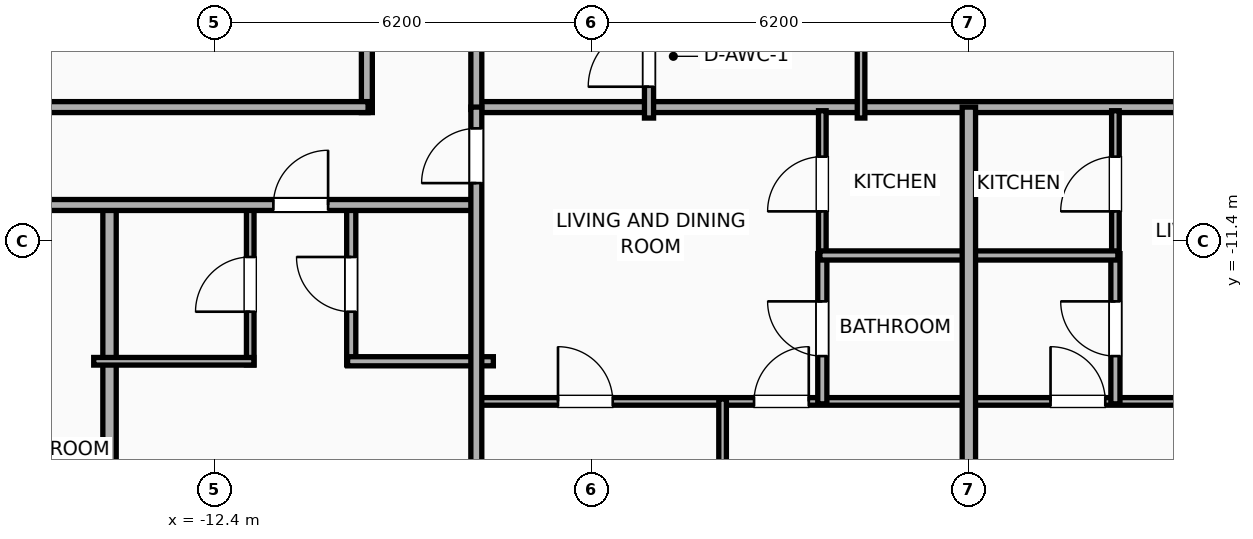
"""IFC4 building model, lengths in metres.
Left out: names, types, materials, properties, quantities, classifications, styles, units other than length and angle.
Written with IfcOpenShell. Run it as: python <this file> out.ifc"""

import sys

from ifc_helpers import new_model, si_unit, direction, frame, frame_2d, origin, place, context, subcontext, project, spatial, rectangle, extrude, element, fill, save


model = new_model("IFC4")
c1 = context("Model", 3, precision=1e-05, world=origin(), true_north=direction((0.0, 1.0)))
c2 = subcontext(c1, "Body", "Model", "MODEL_VIEW")
j1 = project(units=[si_unit("LENGTHUNIT", "METRE"), si_unit("PLANEANGLEUNIT", "RADIAN")], contexts=[c1])
p1 = place(None, origin())
s1 = spatial("IfcSite", under=j1, at=p1, CompositionType="ELEMENT")
p2 = place(p1, origin())
s2 = spatial("IfcBuilding", under=s1, at=p2, CompositionType="ELEMENT")
p3 = place(p2, frame((0.0, 0.0, 219.7)))
s3 = spatial("IfcBuildingStorey", under=s2, at=p3, CompositionType="ELEMENT", Elevation=219.7)
p4 = place(p3, frame((-9.9, -9.28, 0.0), z_axis=(0.0, 0.0, 1.0), x_axis=(0.0, 1.0, 0.0)))
e1 = element("IfcWall", 1, at=p4, inside=s3, PredefinedType="PARTITIONING", context=c2, shape_type="SweptSolid", body=[
    extrude(rectangle(XDim=18.56, YDim=0.18, at=frame_2d((9.28, 0.0))), origin(), (0.0, 0.0, 1.0), 3.65),
])
p5 = place(p4, frame((7.802, 0.0, 0.0)))
e2 = element("IfcOpeningElement", 2, at=p5, cuts=e1, PredefinedType="OPENING", context=c2, shape_type="SweptSolid", body=[
    extrude(rectangle(XDim=1.1, YDim=2.05, at=frame_2d((0.55, 1.025))), frame((0.0, 0.1, 0.0), z_axis=(0.0, -1.0, 0.0), x_axis=(1.0, 0.0, 0.0)), (0.0, 0.0, 1.0), 0.2),
])
p6 = place(p3, frame((-26.23, -9.19, 0.0), z_axis=(0.0, 0.0, 1.0), x_axis=(1.0, 0.0, 0.0)))
e3 = element("IfcWall", 3, at=p6, inside=s3, PredefinedType="PARTITIONING", context=c2, shape_type="SweptSolid", body=[
    extrude(rectangle(XDim=16.35, YDim=0.18, at=frame_2d((8.175, 0.0))), origin(), (0.0, 0.0, 1.0), 3.65),
])
p7 = place(p3, frame((-8.15, -9.19, 0.0), z_axis=(0.0, 0.0, 1.0), x_axis=(1.0, 0.0, 0.0)))
e4 = element("IfcWall", 4, at=p7, inside=s3, PredefinedType="PARTITIONING", context=c2, shape_type="SweptSolid", body=[
    extrude(rectangle(XDim=16.3, YDim=0.18, at=frame_2d((8.15, 0.0))), origin(), (0.0, 0.0, 1.0), 3.65),
])
p8 = place(p3, frame((-8.1, -9.23, 0.0), z_axis=(0.0, 0.0, 1.0), x_axis=(0.0, 1.0, 0.0)))
e5 = element("IfcWall", 5, at=p8, inside=s3, PredefinedType="PARTITIONING", context=c2, shape_type="SweptSolid", body=[
    extrude(rectangle(XDim=18.46, YDim=0.18, at=frame_2d((9.23, 0.0))), origin(), (0.0, 0.0, 1.0), 3.65),
])
p9 = place(p8, frame((1.346, 0.0, 0.0)))
e6 = element("IfcOpeningElement", 6, at=p9, cuts=e5, PredefinedType="OPENING", context=c2, shape_type="SweptSolid", body=[
    extrude(rectangle(XDim=1.0, YDim=2.05, at=frame_2d((0.5, 1.025))), frame((0.0, 0.1, 0.0), z_axis=(0.0, -1.0, 0.0), x_axis=(1.0, 0.0, 0.0)), (0.0, 0.0, 1.0), 0.2),
])
p10 = place(p8, frame((10.601, 0.0, 0.0)))
e7 = element("IfcOpeningElement", 7, at=p10, cuts=e5, PredefinedType="OPENING", context=c2, shape_type="SweptSolid", body=[
    extrude(rectangle(XDim=0.95, YDim=2.05, at=frame_2d((0.475, 1.025))), frame((0.0, 0.1, 0.0), z_axis=(0.0, -1.0, 0.0), x_axis=(1.0, 0.0, 0.0)), (0.0, 0.0, 1.0), 0.2),
])
p11 = place(p3, frame((-5.26, -9.37, 0.0), z_axis=(0.0, 0.0, 1.0), x_axis=(0.0, 1.0, 0.0)))
e8 = element("IfcWall", 8, at=p11, inside=s3, PredefinedType="PLUMBINGWALL", context=c2, shape_type="SweptSolid", body=[
    extrude(rectangle(XDim=3.35, YDim=0.15, at=frame_2d((1.675, 0.0))), origin(), (0.0, 0.0, 1.0), 3.65),
])
p12 = place(p11, frame((0.515, 0.0, 0.0)))
e9 = element("IfcOpeningElement", 9, at=p12, cuts=e8, PredefinedType="OPENING", context=c2, shape_type="SweptSolid", body=[
    extrude(rectangle(XDim=1.0, YDim=2.05, at=frame_2d((0.5, 1.025))), frame((0.0, 0.085, 0.0), z_axis=(0.0, -1.0, 0.0), x_axis=(1.0, 0.0, 0.0)), (0.0, 0.0, 1.0), 0.17),
])
p13 = place(p3, frame((-1.773, -9.37, 0.0), z_axis=(0.0, 0.0, 1.0), x_axis=(0.0, 1.0, 0.0)))
e10 = element("IfcWall", 10, at=p13, inside=s3, PredefinedType="PARTITIONING", context=c2, shape_type="SweptSolid", body=[
    extrude(rectangle(XDim=18.69, YDim=0.125, at=frame_2d((9.345, 0.0))), origin(), (0.0, 0.0, 1.0), 3.65),
])
p14 = place(p13, frame((8.87, 0.0, 0.0)))
e11 = element("IfcOpeningElement", 11, at=p14, cuts=e10, PredefinedType="OPENING", context=c2, shape_type="SweptSolid", body=[
    extrude(rectangle(XDim=0.95, YDim=2.05, at=frame_2d((0.475, 1.025))), frame((0.0, 0.073, 0.0), z_axis=(0.0, -1.0, 0.0), x_axis=(1.0, 0.0, 0.0)), (0.0, 0.0, 1.0), 0.145),
])
p15 = place(p3, frame((-14.132, -18.83, 0.0), z_axis=(0.0, 0.0, 1.0), x_axis=(0.0, 1.0, 0.0)))
e12 = element("IfcWall", 12, at=p15, inside=s3, PredefinedType="PARTITIONING", context=c2, shape_type="SweptSolid", body=[
    extrude(rectangle(XDim=8.11, YDim=0.22, at=frame_2d((4.055, 0.0))), origin(), (0.0, 0.0, 1.0), 3.65),
])
p16 = place(p3, frame((-11.818, -13.43, 0.0), z_axis=(0.0, 0.0, 1.0), x_axis=(0.0, 1.0, 0.0)))
e13 = element("IfcWall", 13, at=p16, inside=s3, PredefinedType="PARTITIONING", context=c2, shape_type="SweptSolid", body=[
    extrude(rectangle(XDim=2.65, YDim=0.125, at=frame_2d((1.325, 0.0))), origin(), (0.0, 0.0, 1.0), 3.65),
])
p17 = place(p16, frame((0.875, 0.0, 0.0)))
e14 = element("IfcOpeningElement", 14, at=p17, cuts=e13, PredefinedType="OPENING", context=c2, shape_type="SweptSolid", body=[
    extrude(rectangle(XDim=0.9, YDim=2.05, at=frame_2d((0.45, 1.025))), frame((0.0, 0.073, 0.0), z_axis=(0.0, -1.0, 0.0), x_axis=(1.0, 0.0, 0.0)), (0.0, 0.0, 1.0), 0.145),
])
p18 = place(p3, frame((-10.157, -13.43, 0.0), z_axis=(0.0, 0.0, 1.0), x_axis=(0.0, 1.0, 0.0)))
e15 = element("IfcWall", 15, at=p18, inside=s3, PredefinedType="PLUMBINGWALL", context=c2, shape_type="SweptSolid", body=[
    extrude(rectangle(XDim=2.65, YDim=0.15, at=frame_2d((1.325, 0.0))), origin(), (0.0, 0.0, 1.0), 3.65),
])
p19 = place(p18, frame((0.875, 0.0, 0.0)))
e16 = element("IfcOpeningElement", 16, at=p19, cuts=e15, PredefinedType="OPENING", context=c2, shape_type="SweptSolid", body=[
    extrude(rectangle(XDim=0.9, YDim=2.05, at=frame_2d((0.45, 1.025))), frame((0.0, 0.085, 0.0), z_axis=(0.0, -1.0, 0.0), x_axis=(1.0, 0.0, 0.0)), (0.0, 0.0, 1.0), 0.17),
])
p20 = place(p3, frame((-14.392, -13.37, 0.0), z_axis=(0.0, 0.0, 1.0), x_axis=(1.0, 0.0, 0.0)))
e17 = element("IfcWall", 17, at=p20, inside=s3, PredefinedType="PARTITIONING", context=c2, shape_type="SweptSolid", body=[
    extrude(rectangle(XDim=2.634, YDim=0.125, at=frame_2d((1.317, 0.0))), origin(), (0.0, 0.0, 1.0), 3.65),
])
p21 = place(p3, frame((-10.217, -13.37, 0.0), z_axis=(0.0, 0.0, 1.0), x_axis=(1.0, 0.0, 0.0)))
e18 = element("IfcWall", 18, at=p21, inside=s3, PredefinedType="PLUMBINGWALL", context=c2, shape_type="SweptSolid", body=[
    extrude(rectangle(XDim=2.397, YDim=0.15, at=frame_2d((1.198, 0.0))), origin(), (0.0, 0.0, 1.0), 3.65),
])
p22 = place(p3, frame((-26.23, -10.8, 0.0), z_axis=(0.0, 0.0, 1.0), x_axis=(1.0, 0.0, 0.0)))
e19 = element("IfcWall", 19, at=p22, inside=s3, PredefinedType="PARTITIONING", context=c2, shape_type="SweptSolid", body=[
    extrude(rectangle(XDim=18.15, YDim=0.18, at=frame_2d((9.075, 0.0))), origin(), (0.0, 0.0, 1.0), 3.65),
])
p23 = place(p22, frame((2.659, 0.0, 0.0)))
e20 = element("IfcOpeningElement", 20, at=p23, cuts=e19, PredefinedType="OPENING", context=c2, shape_type="SweptSolid", body=[
    extrude(rectangle(XDim=0.9, YDim=2.05, at=frame_2d((0.45, 1.025))), frame((0.0, 0.1, 0.0), z_axis=(0.0, -1.0, 0.0), x_axis=(1.0, 0.0, 0.0)), (0.0, 0.0, 1.0), 0.2),
])
p24 = place(p22, frame((9.754, 0.0, 0.0)))
e21 = element("IfcOpeningElement", 21, at=p24, cuts=e19, PredefinedType="OPENING", context=c2, shape_type="SweptSolid", body=[
    extrude(rectangle(XDim=1.15, YDim=2.05, at=frame_2d((0.575, 1.025))), frame((0.0, 0.1, 0.0), z_axis=(0.0, -1.0, 0.0), x_axis=(1.0, 0.0, 0.0)), (0.0, 0.0, 1.0), 0.2),
])
p25 = place(p22, frame((14.792, 0.0, 0.0)))
e22 = element("IfcOpeningElement", 22, at=p25, cuts=e19, PredefinedType="OPENING", context=c2, shape_type="SweptSolid", body=[
    extrude(rectangle(XDim=0.9, YDim=2.05, at=frame_2d((0.45, 1.025))), frame((0.0, 0.1, 0.0), z_axis=(0.0, -1.0, 0.0), x_axis=(1.0, 0.0, 0.0)), (0.0, 0.0, 1.0), 0.2),
])
p26 = place(p3, frame((-8.08, -14.03, 0.0), z_axis=(0.0, 0.0, 1.0), x_axis=(1.0, 0.0, 0.0)))
e23 = element("IfcWall", 23, at=p26, inside=s3, PredefinedType="PARTITIONING", context=c2, shape_type="SweptSolid", body=[
    extrude(rectangle(XDim=8.06, YDim=0.125, at=frame_2d((4.03, 0.0))), origin(), (0.0, 0.0, 1.0), 3.65),
])
p27 = place(p26, frame((1.323, 0.0, 0.0)))
e24 = element("IfcOpeningElement", 24, at=p27, cuts=e23, PredefinedType="OPENING", context=c2, shape_type="SweptSolid", body=[
    extrude(rectangle(XDim=0.9, YDim=2.05, at=frame_2d((0.45, 1.025))), frame((0.0, 0.073, 0.0), z_axis=(0.0, -1.0, 0.0), x_axis=(1.0, 0.0, 0.0)), (0.0, 0.0, 1.0), 0.145),
])
p28 = place(p26, frame((4.547, 0.0, 0.0)))
e25 = element("IfcOpeningElement", 25, at=p28, cuts=e23, PredefinedType="OPENING", context=c2, shape_type="SweptSolid", body=[
    extrude(rectangle(XDim=0.9, YDim=2.05, at=frame_2d((0.45, 1.025))), frame((0.0, 0.073, 0.0), z_axis=(0.0, -1.0, 0.0), x_axis=(1.0, 0.0, 0.0)), (0.0, 0.0, 1.0), 0.145),
])
p29 = place(p3, frame((-2.41, -11.66, 0.0), z_axis=(0.0, 0.0, 1.0), x_axis=(0.0, 1.0, 0.0)))
e26 = element("IfcWall", 26, at=p29, inside=s3, PredefinedType="PARTITIONING", context=c2, shape_type="SweptSolid", body=[
    extrude(rectangle(XDim=2.41, YDim=0.125, at=frame_2d((1.205, 0.0))), origin(), (0.0, 0.0, 1.0), 3.65),
])
p30 = place(p29, frame((0.755, 0.0, 0.0)))
e27 = element("IfcOpeningElement", 27, at=p30, cuts=e26, PredefinedType="OPENING", context=c2, shape_type="SweptSolid", body=[
    extrude(rectangle(XDim=0.9, YDim=2.05, at=frame_2d((0.45, 1.025))), frame((0.0, 0.073, 0.0), z_axis=(0.0, -1.0, 0.0), x_axis=(1.0, 0.0, 0.0)), (0.0, 0.0, 1.0), 0.145),
])
p31 = place(p3, frame((-2.41, -14.07, 0.0), z_axis=(0.0, 0.0, 1.0), x_axis=(0.0, 1.0, 0.0)))
e28 = element("IfcWall", 28, at=p31, inside=s3, PredefinedType="PLUMBINGWALL", context=c2, shape_type="SweptSolid", body=[
    extrude(rectangle(XDim=2.47, YDim=0.15, at=frame_2d((1.235, 0.0))), origin(), (0.0, 0.0, 1.0), 3.65),
])
p32 = place(p31, frame((0.785, 0.0, 0.0)))
e29 = element("IfcOpeningElement", 29, at=p32, cuts=e28, PredefinedType="OPENING", context=c2, shape_type="SweptSolid", body=[
    extrude(rectangle(XDim=0.9, YDim=2.05, at=frame_2d((0.45, 1.025))), frame((0.0, 0.085, 0.0), z_axis=(0.0, -1.0, 0.0), x_axis=(1.0, 0.0, 0.0)), (0.0, 0.0, 1.0), 0.17),
])
p33 = place(p3, frame((-2.45, -11.63, 0.0), z_axis=(0.0, 0.0, 1.0), x_axis=(1.0, 0.0, 0.0)))
e30 = element("IfcWall", 30, at=p33, inside=s3, PredefinedType="PLUMBINGWALL", context=c2, shape_type="SweptSolid", body=[
    extrude(rectangle(XDim=2.43, YDim=0.15, at=frame_2d((1.215, 0.0))), origin(), (0.0, 0.0, 1.0), 3.65),
])
p34 = place(p3, frame((-4.05, -18.83, 0.0), z_axis=(0.0, 0.0, 1.0), x_axis=(0.0, 1.0, 0.0)))
e31 = element("IfcWall", 31, at=p34, inside=s3, PredefinedType="PARTITIONING", context=c2, shape_type="SweptSolid", body=[
    extrude(rectangle(XDim=4.84, YDim=0.125, at=frame_2d((2.42, 0.0))), origin(), (0.0, 0.0, 1.0), 3.65),
])
p35 = place(p3, frame((-8.1, -18.83, 0.0), z_axis=(0.0, 0.0, 1.0), x_axis=(0.0, 1.0, 0.0)))
e32 = element("IfcWall", 32, at=p35, inside=s3, PredefinedType="PARTITIONING", context=c2, shape_type="SweptSolid", body=[
    extrude(rectangle(XDim=9.64, YDim=0.18, at=frame_2d((4.82, 0.0))), origin(), (0.0, 0.0, 1.0), 3.65),
])
p36 = place(p35, frame((8.39, 0.0, 0.0)))
e33 = element("IfcOpeningElement", 33, at=p36, cuts=e32, PredefinedType="OPENING", context=c2, shape_type="SweptSolid", body=[
    extrude(rectangle(XDim=0.9, YDim=2.05, at=frame_2d((0.45, 1.025))), frame((0.0, 0.1, 0.0), z_axis=(0.0, -1.0, 0.0), x_axis=(1.0, 0.0, 0.0)), (0.0, 0.0, 1.0), 0.2),
])
p37 = place(p3, frame((0.02, -14.03, 0.0), z_axis=(0.0, 0.0, 1.0), x_axis=(1.0, 0.0, 0.0)))
e34 = element("IfcWall", 34, at=p37, inside=s3, PredefinedType="PARTITIONING", context=c2, shape_type="SweptSolid", body=[
    extrude(rectangle(XDim=8.06, YDim=0.125, at=frame_2d((4.03, 0.0))), origin(), (0.0, 0.0, 1.0), 3.65),
])
p38 = place(p37, frame((1.323, 0.0, 0.0)))
e35 = element("IfcOpeningElement", 35, at=p38, cuts=e34, PredefinedType="OPENING", context=c2, shape_type="SweptSolid", body=[
    extrude(rectangle(XDim=0.9, YDim=2.05, at=frame_2d((0.45, 1.025))), frame((0.0, 0.073, 0.0), z_axis=(0.0, -1.0, 0.0), x_axis=(1.0, 0.0, 0.0)), (0.0, 0.0, 1.0), 0.145),
])
p39 = place(p37, frame((5.837, 0.0, 0.0)))
e36 = element("IfcOpeningElement", 36, at=p39, cuts=e34, PredefinedType="OPENING", context=c2, shape_type="SweptSolid", body=[
    extrude(rectangle(XDim=0.9, YDim=2.05, at=frame_2d((0.45, 1.025))), frame((0.0, 0.073, 0.0), z_axis=(0.0, -1.0, 0.0), x_axis=(1.0, 0.0, 0.0)), (0.0, 0.0, 1.0), 0.145),
])
p40 = place(p3, frame((2.41, -11.66, 0.0), z_axis=(0.0, 0.0, 1.0), x_axis=(0.0, 1.0, 0.0)))
e37 = element("IfcWall", 37, at=p40, inside=s3, PredefinedType="PARTITIONING", context=c2, shape_type="SweptSolid", body=[
    extrude(rectangle(XDim=2.41, YDim=0.125, at=frame_2d((1.205, 0.0))), origin(), (0.0, 0.0, 1.0), 3.65),
])
p41 = place(p40, frame((0.755, 0.0, 0.0)))
e38 = element("IfcOpeningElement", 38, at=p41, cuts=e37, PredefinedType="OPENING", context=c2, shape_type="SweptSolid", body=[
    extrude(rectangle(XDim=0.9, YDim=2.05, at=frame_2d((0.45, 1.025))), frame((0.0, 0.073, 0.0), z_axis=(0.0, -1.0, 0.0), x_axis=(1.0, 0.0, 0.0)), (0.0, 0.0, 1.0), 0.145),
])
p42 = place(p3, frame((2.41, -14.07, 0.0), z_axis=(0.0, 0.0, 1.0), x_axis=(0.0, 1.0, 0.0)))
e39 = element("IfcWall", 39, at=p42, inside=s3, PredefinedType="PLUMBINGWALL", context=c2, shape_type="SweptSolid", body=[
    extrude(rectangle(XDim=2.47, YDim=0.15, at=frame_2d((1.235, 0.0))), origin(), (0.0, 0.0, 1.0), 3.65),
])
p43 = place(p42, frame((0.785, 0.0, 0.0)))
e40 = element("IfcOpeningElement", 40, at=p43, cuts=e39, PredefinedType="OPENING", context=c2, shape_type="SweptSolid", body=[
    extrude(rectangle(XDim=0.9, YDim=2.05, at=frame_2d((0.45, 1.025))), frame((0.0, 0.085, 0.0), z_axis=(0.0, -1.0, 0.0), x_axis=(1.0, 0.0, 0.0)), (0.0, 0.0, 1.0), 0.17),
])
p44 = place(p3, frame((0.02, -11.63, 0.0), z_axis=(0.0, 0.0, 1.0), x_axis=(1.0, 0.0, 0.0)))
e41 = element("IfcWall", 41, at=p44, inside=s3, PredefinedType="PLUMBINGWALL", context=c2, shape_type="SweptSolid", body=[
    extrude(rectangle(XDim=2.43, YDim=0.15, at=frame_2d((1.215, 0.0))), origin(), (0.0, 0.0, 1.0), 3.65),
])
p45 = place(p3, frame((0.0, -18.83, 0.0), z_axis=(0.0, 0.0, 1.0), x_axis=(0.0, 1.0, 0.0)))
e42 = element("IfcWall", 42, at=p45, inside=s3, PredefinedType="PARTITIONING", context=c2, shape_type="SweptSolid", body=[
    extrude(rectangle(XDim=9.64, YDim=0.22, at=frame_2d((4.82, 0.0))), origin(), (0.0, 0.0, 1.0), 3.65),
])
p46 = place(p12, origin())
e43 = element("IfcDoor", 43, at=p46, inside=s3, OperationType="SINGLE_SWING_LEFT", PredefinedType="DOOR", context=c2, shape_type="SweptSolid", body=[
    extrude(rectangle(XDim=1.0, YDim=2.05, at=frame_2d((0.5, 1.025))), frame((0.0, 0.025, 0.0), z_axis=(0.0, -1.0, 0.0), x_axis=(1.0, 0.0, 0.0)), (0.0, 0.0, 1.0), 0.05),
])
fill(e9, e43)
p47 = place(p17, origin())
e44 = element("IfcDoor", 44, at=p47, inside=s3, OperationType="SINGLE_SWING_LEFT", PredefinedType="DOOR", context=c2, shape_type="SweptSolid", body=[
    extrude(rectangle(XDim=0.9, YDim=2.05, at=frame_2d((0.45, 1.025))), frame((0.0, 0.025, 0.0), z_axis=(0.0, -1.0, 0.0), x_axis=(1.0, 0.0, 0.0)), (0.0, 0.0, 1.0), 0.05),
])
fill(e14, e44)
p48 = place(p19, origin())
e45 = element("IfcDoor", 45, at=p48, inside=s3, OperationType="SINGLE_SWING_RIGHT", PredefinedType="DOOR", context=c2, shape_type="SweptSolid", body=[
    extrude(rectangle(XDim=0.9, YDim=2.05, at=frame_2d((0.45, 1.025))), frame((0.0, 0.025, 0.0), z_axis=(0.0, -1.0, 0.0), x_axis=(1.0, 0.0, 0.0)), (0.0, 0.0, 1.0), 0.05),
])
fill(e16, e45)
p49 = place(p25, origin())
e46 = element("IfcDoor", 46, at=p49, inside=s3, OperationType="SINGLE_SWING_RIGHT", PredefinedType="DOOR", context=c2, shape_type="SweptSolid", body=[
    extrude(rectangle(XDim=0.9, YDim=2.05, at=frame_2d((0.45, 1.025))), frame((0.0, 0.025, 0.0), z_axis=(0.0, -1.0, 0.0), x_axis=(1.0, 0.0, 0.0)), (0.0, 0.0, 1.0), 0.05),
])
fill(e22, e46)
p50 = place(p27, origin())
e47 = element("IfcDoor", 47, at=p50, inside=s3, OperationType="SINGLE_SWING_LEFT", PredefinedType="DOOR", context=c2, shape_type="SweptSolid", body=[
    extrude(rectangle(XDim=0.9, YDim=2.05, at=frame_2d((0.45, 1.025))), frame((0.0, 0.025, 0.0), z_axis=(0.0, -1.0, 0.0), x_axis=(1.0, 0.0, 0.0)), (0.0, 0.0, 1.0), 0.05),
])
fill(e24, e47)
p51 = place(p28, origin())
e48 = element("IfcDoor", 48, at=p51, inside=s3, OperationType="SINGLE_SWING_RIGHT", PredefinedType="DOOR", context=c2, shape_type="SweptSolid", body=[
    extrude(rectangle(XDim=0.9, YDim=2.05, at=frame_2d((0.45, 1.025))), frame((0.0, 0.025, 0.0), z_axis=(0.0, -1.0, 0.0), x_axis=(1.0, 0.0, 0.0)), (0.0, 0.0, 1.0), 0.05),
])
fill(e25, e48)
p52 = place(p30, origin())
e49 = element("IfcDoor", 49, at=p52, inside=s3, OperationType="SINGLE_SWING_LEFT", PredefinedType="DOOR", context=c2, shape_type="SweptSolid", body=[
    extrude(rectangle(XDim=0.9, YDim=2.05, at=frame_2d((0.45, 1.025))), frame((0.0, 0.025, 0.0), z_axis=(0.0, -1.0, 0.0), x_axis=(1.0, 0.0, 0.0)), (0.0, 0.0, 1.0), 0.05),
])
fill(e27, e49)
p53 = place(p32, origin())
e50 = element("IfcDoor", 50, at=p53, inside=s3, OperationType="SINGLE_SWING_RIGHT", PredefinedType="DOOR", context=c2, shape_type="SweptSolid", body=[
    extrude(rectangle(XDim=0.9, YDim=2.05, at=frame_2d((0.45, 1.025))), frame((0.0, 0.025, 0.0), z_axis=(0.0, -1.0, 0.0), x_axis=(1.0, 0.0, 0.0)), (0.0, 0.0, 1.0), 0.05),
])
fill(e29, e50)
p54 = place(p36, origin())
e51 = element("IfcDoor", 51, at=p54, inside=s3, OperationType="SINGLE_SWING_LEFT", PredefinedType="DOOR", context=c2, shape_type="SweptSolid", body=[
    extrude(rectangle(XDim=0.9, YDim=2.05, at=frame_2d((0.45, 1.025))), frame((0.0, 0.025, 0.0), z_axis=(0.0, -1.0, 0.0), x_axis=(1.0, 0.0, 0.0)), (0.0, 0.0, 1.0), 0.05),
])
fill(e33, e51)
p55 = place(p38, origin())
e52 = element("IfcDoor", 52, at=p55, inside=s3, OperationType="SINGLE_SWING_LEFT", PredefinedType="DOOR", context=c2, shape_type="SweptSolid", body=[
    extrude(rectangle(XDim=0.9, YDim=2.05, at=frame_2d((0.45, 1.025))), frame((0.0, 0.025, 0.0), z_axis=(0.0, -1.0, 0.0), x_axis=(1.0, 0.0, 0.0)), (0.0, 0.0, 1.0), 0.05),
])
fill(e35, e52)
p56 = place(p41, origin())
e53 = element("IfcDoor", 53, at=p56, inside=s3, OperationType="SINGLE_SWING_LEFT", PredefinedType="DOOR", context=c2, shape_type="SweptSolid", body=[
    extrude(rectangle(XDim=0.9, YDim=2.05, at=frame_2d((0.45, 1.025))), frame((0.0, 0.025, 0.0), z_axis=(0.0, -1.0, 0.0), x_axis=(1.0, 0.0, 0.0)), (0.0, 0.0, 1.0), 0.05),
])
fill(e38, e53)
p57 = place(p43, origin())
e54 = element("IfcDoor", 54, at=p57, inside=s3, OperationType="SINGLE_SWING_RIGHT", PredefinedType="DOOR", context=c2, shape_type="SweptSolid", body=[
    extrude(rectangle(XDim=0.9, YDim=2.05, at=frame_2d((0.45, 1.025))), frame((0.0, 0.025, 0.0), z_axis=(0.0, -1.0, 0.0), x_axis=(1.0, 0.0, 0.0)), (0.0, 0.0, 1.0), 0.05),
])
fill(e40, e54)
save(model, sys.argv[1])
